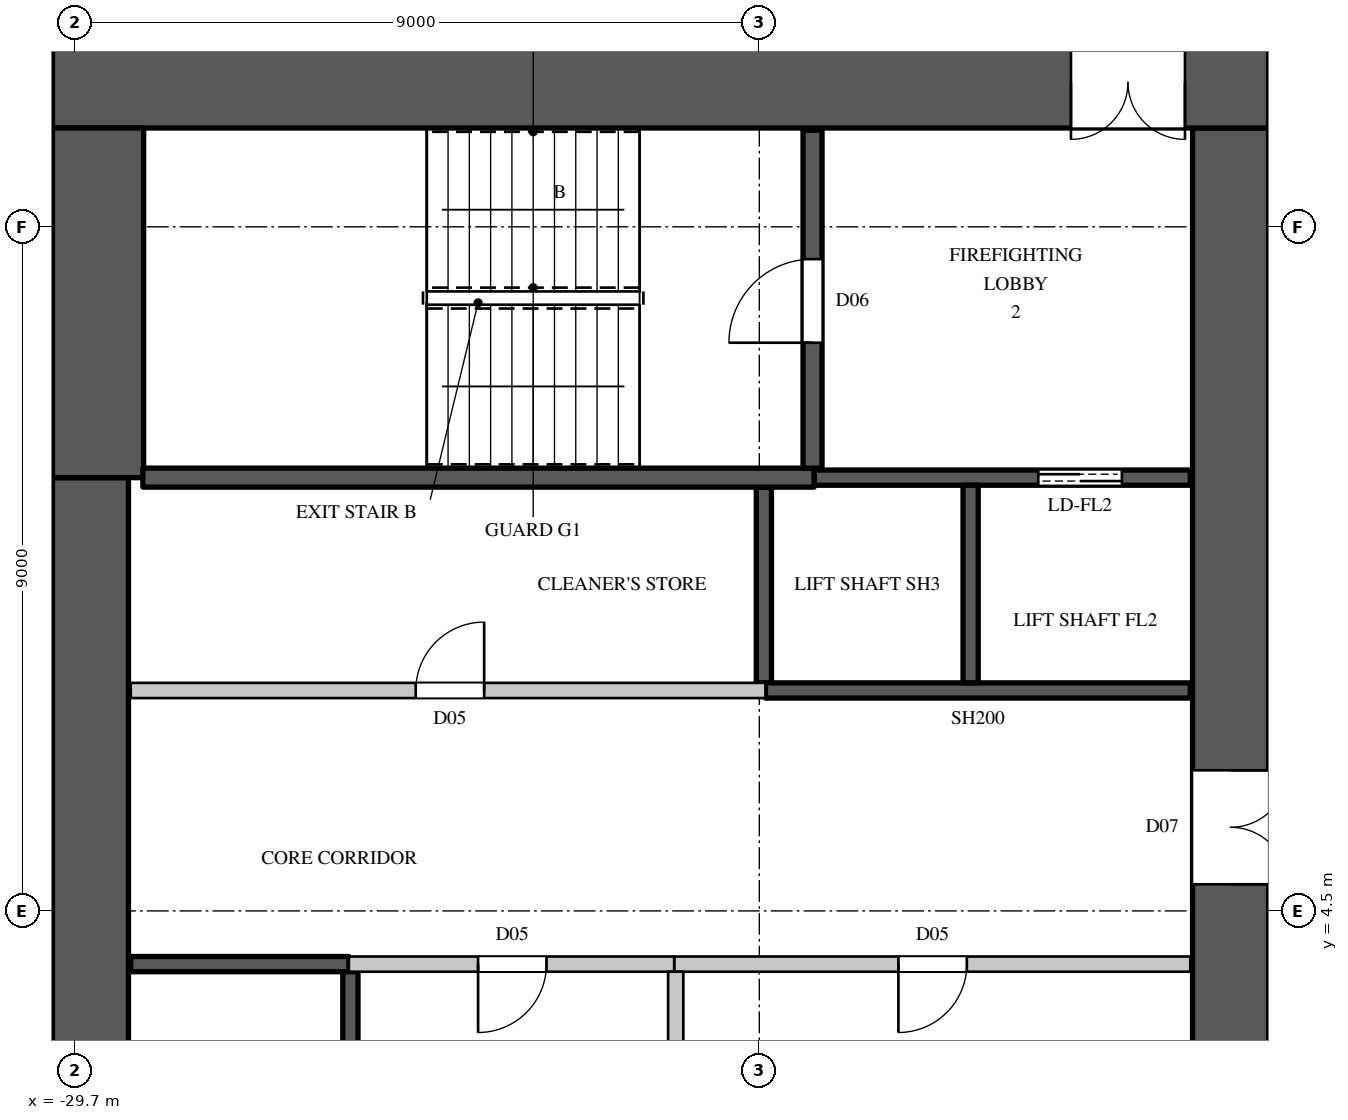
"""IFC4 building model, lengths in metres.
Left out: names, types, materials, properties, quantities, classifications, styles, units other than length and angle.
Written with IfcOpenShell. Run it as: python <this file> out.ifc"""

import sys

from ifc_helpers import new_model, si_unit, direction, frame, frame_2d, origin, place, context, subcontext, project, spatial, rectangle, extrude, element, fill, save


model = new_model("IFC4")
c1 = context("Model", 3, precision=1e-05, world=origin(), true_north=direction((0.0, 1.0)))
c2 = subcontext(c1, "Body", "Model", "MODEL_VIEW")
j1 = project(units=[si_unit("LENGTHUNIT", "METRE"), si_unit("PLANEANGLEUNIT", "RADIAN")], contexts=[c1])
p1 = place(None, origin())
s1 = spatial("IfcSite", under=j1, at=p1, CompositionType="ELEMENT")
p2 = place(p1, origin())
s2 = spatial("IfcBuilding", under=s1, at=p2, CompositionType="ELEMENT")
p3 = place(p2, frame((0.0, 0.0, 105.9)))
s3 = spatial("IfcBuildingStorey", under=s2, at=p3, CompositionType="ELEMENT", Elevation=105.9)
p4 = place(p3, frame((-30.0, 15.4, 0.0), z_axis=(0.0, 0.0, 1.0), x_axis=(1.0, 0.0, 0.0)))
e1 = element("IfcWall", 1, at=p4, inside=s3, PredefinedType="SHEAR", context=c2, shape_type="SweptSolid", body=[
    extrude(rectangle(XDim=16.0, YDim=1.2, at=frame_2d((8.0, 0.0))), origin(), (0.0, 0.0, 1.0), 3.6),
])
p5 = place(p4, frame((13.4, 0.0, 0.0)))
e2 = element("IfcOpeningElement", 2, at=p5, cuts=e1, PredefinedType="OPENING", context=c2, shape_type="SweptSolid", body=[
    extrude(rectangle(XDim=1.5, YDim=2.4, at=frame_2d((0.75, 1.2))), frame((0.0, 0.61, 0.0), z_axis=(0.0, -1.0, 0.0), x_axis=(1.0, 0.0, 0.0)), (0.0, 0.0, 1.0), 1.22),
])
p6 = place(p3, frame((-14.5, -14.8, 0.0), z_axis=(0.0, 0.0, 1.0), x_axis=(0.0, 1.0, 0.0)))
e3 = element("IfcWall", 3, at=p6, inside=s3, PredefinedType="SHEAR", context=c2, shape_type="SweptSolid", body=[
    extrude(rectangle(XDim=29.6, YDim=1.0, at=frame_2d((14.8, 0.0))), origin(), (0.0, 0.0, 1.0), 3.6),
])
p7 = place(p6, frame((8.45, 0.0, 0.0)))
e4 = element("IfcOpeningElement", 4, at=p7, cuts=e3, PredefinedType="OPENING", context=c2, shape_type="SweptSolid", body=[
    extrude(rectangle(XDim=1.5, YDim=2.4, at=frame_2d((0.75, 1.2))), frame((0.0, 0.51, 0.0), z_axis=(0.0, -1.0, 0.0), x_axis=(1.0, 0.0, 0.0)), (0.0, 0.0, 1.0), 1.02),
])
p8 = place(p6, frame((19.65, 0.0, 0.0)))
e5 = element("IfcOpeningElement", 5, at=p8, cuts=e3, PredefinedType="OPENING", context=c2, shape_type="SweptSolid", body=[
    extrude(rectangle(XDim=1.5, YDim=2.4, at=frame_2d((0.75, 1.2))), frame((0.0, 0.51, 0.0), z_axis=(0.0, -1.0, 0.0), x_axis=(1.0, 0.0, 0.0)), (0.0, 0.0, 1.0), 1.02),
])
p9 = place(p6, frame((14.5, 0.0, 0.0)))
e6 = element("IfcOpeningElement", 6, at=p9, cuts=e3, PredefinedType="OPENING", context=c2, shape_type="SweptSolid", body=[
    extrude(rectangle(XDim=0.6, YDim=2.0, at=frame_2d((0.3, 1.0))), frame((0.0, 0.51, 0.0), z_axis=(0.0, -1.0, 0.0), x_axis=(1.0, 0.0, 0.0)), (0.0, 0.0, 1.0), 1.02),
])
p10 = place(p3, frame((-29.5, -10.2, 0.0), z_axis=(0.0, 0.0, 1.0), x_axis=(0.0, 1.0, 0.0)))
e7 = element("IfcWall", 7, at=p10, inside=s3, PredefinedType="SHEAR", context=c2, shape_type="SweptSolid", body=[
    extrude(rectangle(XDim=20.4, YDim=1.0, at=frame_2d((10.2, 0.0))), origin(), (0.0, 0.0, 1.0), 3.6),
])
p11 = place(p3, frame((-29.4, 10.2, 0.0), z_axis=(0.0, 0.0, 1.0), x_axis=(0.0, 1.0, 0.0)))
e8 = element("IfcWall", 8, at=p11, inside=s3, PredefinedType="SHEAR", context=c2, shape_type="SweptSolid", body=[
    extrude(rectangle(XDim=4.6, YDim=1.2, at=frame_2d((2.3, 0.0))), origin(), (0.0, 0.0, 1.0), 3.6),
])
p12 = place(p3, frame((-28.97, 7.4, 0.0), z_axis=(0.0, 0.0, 1.0), x_axis=(1.0, 0.0, 0.0)))
e9 = element("IfcWall", 9, at=p12, inside=s3, PredefinedType="PARTITIONING", context=c2, shape_type="SweptSolid", body=[
    extrude(rectangle(XDim=8.35, YDim=0.2, at=frame_2d((4.175, 0.0))), origin(), (0.0, 0.0, 1.0), 3.3),
])
p13 = place(p12, frame((3.75, 0.0, 0.0)))
e10 = element("IfcOpeningElement", 10, at=p13, cuts=e9, PredefinedType="OPENING", context=c2, shape_type="SweptSolid", body=[
    extrude(rectangle(XDim=0.9, YDim=2.2, at=frame_2d((0.45, 1.1))), frame((0.0, 0.11, 0.0), z_axis=(0.0, -1.0, 0.0), x_axis=(1.0, 0.0, 0.0)), (0.0, 0.0, 1.0), 0.22),
])
p14 = place(p3, frame((-21.82, 3.8, 0.0), z_axis=(0.0, 0.0, 1.0), x_axis=(1.0, 0.0, 0.0)))
e11 = element("IfcWall", 11, at=p14, inside=s3, PredefinedType="PARTITIONING", context=c2, shape_type="SweptSolid", body=[
    extrude(rectangle(XDim=6.79, YDim=0.2, at=frame_2d((3.395, 0.0))), origin(), (0.0, 0.0, 1.0), 3.3),
])
p15 = place(p14, frame((2.95, 0.0, 0.0)))
e12 = element("IfcOpeningElement", 12, at=p15, cuts=e11, PredefinedType="OPENING", context=c2, shape_type="SweptSolid", body=[
    extrude(rectangle(XDim=0.9, YDim=2.2, at=frame_2d((0.45, 1.1))), frame((0.0, 0.11, 0.0), z_axis=(0.0, -1.0, 0.0), x_axis=(1.0, 0.0, 0.0)), (0.0, 0.0, 1.0), 0.22),
])
p16 = place(p3, frame((-26.1, 3.8, 0.0), z_axis=(0.0, 0.0, 1.0), x_axis=(1.0, 0.0, 0.0)))
e13 = element("IfcWall", 13, at=p16, inside=s3, PredefinedType="PARTITIONING", context=c2, shape_type="SweptSolid", body=[
    extrude(rectangle(XDim=4.28, YDim=0.2, at=frame_2d((2.14, 0.0))), origin(), (0.0, 0.0, 1.0), 3.3),
])
p17 = place(p16, frame((1.7, 0.0, 0.0)))
e14 = element("IfcOpeningElement", 14, at=p17, cuts=e13, PredefinedType="OPENING", context=c2, shape_type="SweptSolid", body=[
    extrude(rectangle(XDim=0.9, YDim=2.2, at=frame_2d((0.45, 1.1))), frame((0.0, 0.11, 0.0), z_axis=(0.0, -1.0, 0.0), x_axis=(1.0, 0.0, 0.0)), (0.0, 0.0, 1.0), 0.22),
])
p18 = place(p3, frame((-21.8, 1.1, 0.0), z_axis=(0.0, 0.0, 1.0), x_axis=(0.0, 1.0, 0.0)))
e15 = element("IfcWall", 15, at=p18, inside=s3, PredefinedType="PARTITIONING", context=c2, shape_type="SweptSolid", body=[
    extrude(rectangle(XDim=2.6, YDim=0.2, at=frame_2d((1.3, 0.0))), origin(), (0.0, 0.0, 1.0), 3.3),
])
p19 = place(p3, frame((-28.97, 3.8, 0.0), z_axis=(0.0, 0.0, 1.0), x_axis=(1.0, 0.0, 0.0)))
e16 = element("IfcWall", 16, at=p19, inside=s3, PredefinedType="SHEAR", context=c2, shape_type="SweptSolid", body=[
    extrude(rectangle(XDim=2.87, YDim=0.2, at=frame_2d((1.435, 0.0))), origin(), (0.0, 0.0, 1.0), 3.3),
])
p20 = place(p3, frame((-26.08, 1.1, 0.0), z_axis=(0.0, 0.0, 1.0), x_axis=(0.0, 1.0, 0.0)))
e17 = element("IfcWall", 17, at=p20, inside=s3, PredefinedType="SHEAR", context=c2, shape_type="SweptSolid", body=[
    extrude(rectangle(XDim=2.6, YDim=0.2, at=frame_2d((1.3, 0.0))), origin(), (0.0, 0.0, 1.0), 3.3),
])
p21 = place(p3, frame((-20.64, 7.5, 0.0), z_axis=(0.0, 0.0, 1.0), x_axis=(0.0, 1.0, 0.0)))
e18 = element("IfcWall", 18, at=p21, inside=s3, PredefinedType="SHEAR", context=c2, shape_type="SweptSolid", body=[
    extrude(rectangle(XDim=2.575, YDim=0.2, at=frame_2d((1.288, 0.0))), origin(), (0.0, 0.0, 1.0), 3.3),
])
p22 = place(p3, frame((-20.62, 7.4, 0.0), z_axis=(0.0, 0.0, 1.0), x_axis=(1.0, 0.0, 0.0)))
e19 = element("IfcWall", 19, at=p22, inside=s3, PredefinedType="SHEAR", context=c2, shape_type="SweptSolid", body=[
    extrude(rectangle(XDim=5.59, YDim=0.2, at=frame_2d((2.795, 0.0))), origin(), (0.0, 0.0, 1.0), 3.3),
])
p23 = place(p3, frame((-19.98, 10.2, 0.0), z_axis=(0.0, 0.0, 1.0), x_axis=(1.0, 0.0, 0.0)))
e20 = element("IfcWall", 20, at=p23, inside=s3, PredefinedType="SHEAR", context=c2, shape_type="SweptSolid", body=[
    extrude(rectangle(XDim=4.95, YDim=0.2, at=frame_2d((2.475, 0.0))), origin(), (0.0, 0.0, 1.0), 3.3),
])
p24 = place(p23, frame((2.95, 0.0, 0.0)))
e21 = element("IfcOpeningElement", 21, at=p24, cuts=e20, PredefinedType="OPENING", context=c2, shape_type="SweptSolid", body=[
    extrude(rectangle(XDim=1.1, YDim=2.2, at=frame_2d((0.55, 1.1))), frame((0.0, 0.11, 0.0), z_axis=(0.0, -1.0, 0.0), x_axis=(1.0, 0.0, 0.0)), (0.0, 0.0, 1.0), 0.22),
])
p25 = place(p3, frame((-17.92, 7.5, 0.0), z_axis=(0.0, 0.0, 1.0), x_axis=(0.0, 1.0, 0.0)))
e22 = element("IfcWall", 22, at=p25, inside=s3, PredefinedType="SHEAR", context=c2, shape_type="SweptSolid", body=[
    extrude(rectangle(XDim=2.6, YDim=0.2, at=frame_2d((1.3, 0.0))), origin(), (0.0, 0.0, 1.0), 3.6),
])
p26 = place(p3, frame((-28.81, 10.2, 0.0), z_axis=(0.0, 0.0, 1.0), x_axis=(1.0, 0.0, 0.0)))
e23 = element("IfcWall", 23, at=p26, inside=s3, PredefinedType="SHEAR", context=c2, shape_type="SweptSolid", body=[
    extrude(rectangle(XDim=8.83, YDim=0.25, at=frame_2d((4.415, 0.0))), origin(), (0.0, 0.0, 1.0), 3.3),
])
p27 = place(p3, frame((-20.0, 10.325, 0.0), z_axis=(0.0, 0.0, 1.0), x_axis=(0.0, 1.0, 0.0)))
e24 = element("IfcWall", 24, at=p27, inside=s3, PredefinedType="SHEAR", context=c2, shape_type="SweptSolid", body=[
    extrude(rectangle(XDim=4.445, YDim=0.25, at=frame_2d((2.223, 0.0))), origin(), (0.0, 0.0, 1.0), 3.3),
])
p28 = place(p27, frame((1.65, 0.0, 0.0)))
e25 = element("IfcOpeningElement", 25, at=p28, cuts=e24, PredefinedType="OPENING", context=c2, shape_type="SweptSolid", body=[
    extrude(rectangle(XDim=1.1, YDim=2.2, at=frame_2d((0.55, 1.1))), frame((0.0, 0.135, 0.0), z_axis=(0.0, -1.0, 0.0), x_axis=(1.0, 0.0, 0.0)), (0.0, 0.0, 1.0), 0.27),
])
p29 = place(p28, origin())
e26 = element("IfcDoor", 26, at=p29, inside=s3, OperationType="SINGLE_SWING_LEFT", PredefinedType="DOOR", context=c2, shape_type="SweptSolid", body=[
    extrude(rectangle(XDim=1.1, YDim=2.2, at=frame_2d((0.55, 1.1))), frame((0.0, 0.025, 0.0), z_axis=(0.0, -1.0, 0.0), x_axis=(1.0, 0.0, 0.0)), (0.0, 0.0, 1.0), 0.05),
])
fill(e25, e26)
p30 = place(p17, origin())
e27 = element("IfcDoor", 27, at=p30, inside=s3, OperationType="SINGLE_SWING_RIGHT", PredefinedType="DOOR", context=c2, shape_type="SweptSolid", body=[
    extrude(rectangle(XDim=0.9, YDim=2.2, at=frame_2d((0.45, 1.1))), frame((0.0, 0.025, 0.0), z_axis=(0.0, -1.0, 0.0), x_axis=(1.0, 0.0, 0.0)), (0.0, 0.0, 1.0), 0.05),
])
fill(e14, e27)
p31 = place(p15, origin())
e28 = element("IfcDoor", 28, at=p31, inside=s3, OperationType="SINGLE_SWING_RIGHT", PredefinedType="DOOR", context=c2, shape_type="SweptSolid", body=[
    extrude(rectangle(XDim=0.9, YDim=2.2, at=frame_2d((0.45, 1.1))), frame((0.0, 0.025, 0.0), z_axis=(0.0, -1.0, 0.0), x_axis=(1.0, 0.0, 0.0)), (0.0, 0.0, 1.0), 0.05),
])
fill(e12, e28)
p32 = place(p13, origin())
e29 = element("IfcDoor", 29, at=p32, inside=s3, OperationType="SINGLE_SWING_RIGHT", PredefinedType="DOOR", context=c2, shape_type="SweptSolid", body=[
    extrude(rectangle(XDim=0.9, YDim=2.2, at=frame_2d((0.45, 1.1))), frame((0.0, 0.025, 0.0), z_axis=(0.0, -1.0, 0.0), x_axis=(1.0, 0.0, 0.0)), (0.0, 0.0, 1.0), 0.05),
])
fill(e10, e29)
p33 = place(p24, origin())
e30 = element("IfcDoor", 30, at=p33, inside=s3, OperationType="DOUBLE_DOOR_SLIDING", PredefinedType="DOOR", context=c2, shape_type="SweptSolid", body=[
    extrude(rectangle(XDim=1.1, YDim=2.2, at=frame_2d((0.55, 1.1))), frame((0.0, 0.025, 0.0), z_axis=(0.0, -1.0, 0.0), x_axis=(1.0, 0.0, 0.0)), (0.0, 0.0, 1.0), 0.05),
])
fill(e21, e30)
p34 = place(p5, origin())
e31 = element("IfcDoor", 31, at=p34, inside=s3, OperationType="DOUBLE_DOOR_SINGLE_SWING", PredefinedType="DOOR", context=c2, shape_type="SweptSolid", body=[
    extrude(rectangle(XDim=1.5, YDim=2.4, at=frame_2d((0.75, 1.2))), frame((0.0, 0.025, 0.0), z_axis=(0.0, -1.0, 0.0), x_axis=(1.0, 0.0, 0.0)), (0.0, 0.0, 1.0), 0.05),
])
fill(e2, e31)
p35 = place(p8, origin())
e32 = element("IfcDoor", 32, at=p35, inside=s3, OperationType="DOUBLE_DOOR_SINGLE_SWING", PredefinedType="DOOR", context=c2, shape_type="SweptSolid", body=[
    extrude(rectangle(XDim=1.5, YDim=2.4, at=frame_2d((0.75, 1.2))), frame((0.0, -0.445, 0.0), z_axis=(0.0, -1.0, 0.0), x_axis=(1.0, 0.0, 0.0)), (0.0, 0.0, 1.0), 0.05),
])
fill(e5, e32)
save(model, sys.argv[1])
